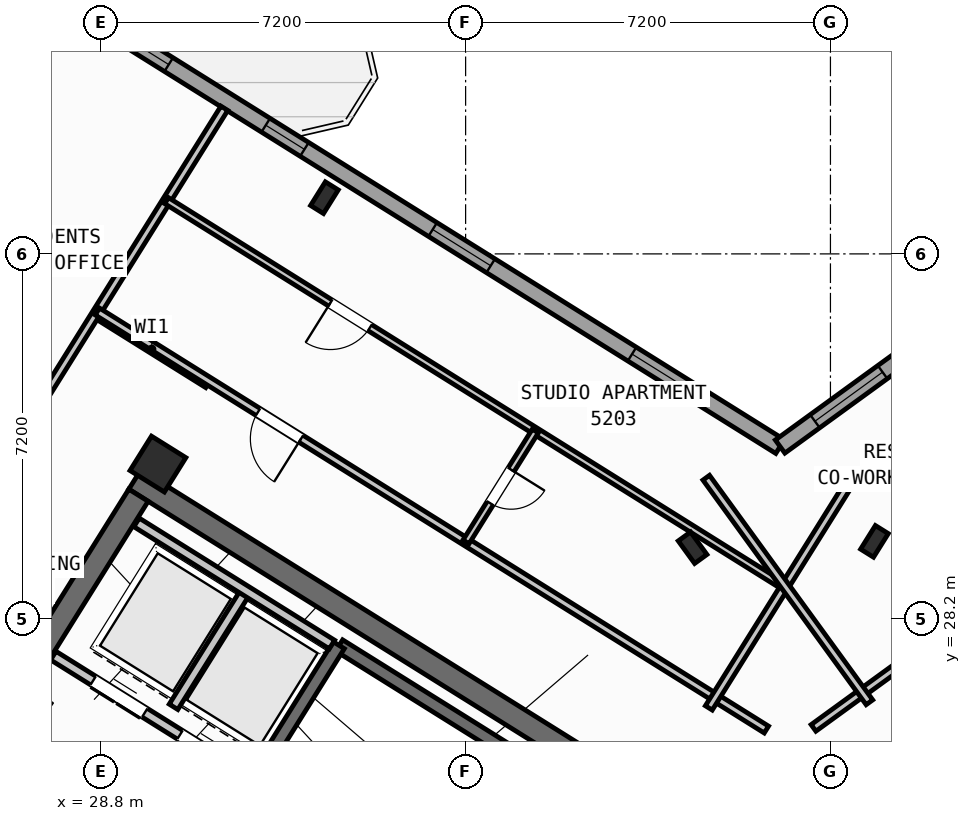
"""IFC4 building model, lengths in metres.
Left out: names, types, materials, properties, quantities, classifications, styles, units other than length and angle.
Written with IfcOpenShell. Run it as: python <this file> out.ifc"""

import sys

from ifc_helpers import new_model, si_unit, direction, frame, frame_2d, origin, origin_2d, place, context, subcontext, project, spatial, rectangle, hollow_rectangle, i_section, extrude, source, transform, mapped, element, fill, save


model = new_model("IFC4")
c1 = context("Model", 3, precision=1e-05, world=origin(), true_north=direction((0.0, 1.0)))
c2 = subcontext(c1, "Body", "Model", "MODEL_VIEW")
j1 = project(units=[si_unit("LENGTHUNIT", "METRE"), si_unit("PLANEANGLEUNIT", "RADIAN")], contexts=[c1])
p1 = place(None, origin())
s1 = spatial("IfcSite", under=j1, at=p1, CompositionType="ELEMENT")
p2 = place(p1, origin())
s2 = spatial("IfcBuilding", under=s1, at=p2, CompositionType="ELEMENT")
p3 = place(p2, frame((0.0, 0.0, 207.6)))
s3 = spatial("IfcBuildingStorey", under=s2, at=p3, CompositionType="ELEMENT", Elevation=207.6)
p4 = place(p3, frame((40.531, 24.036, 0.0), z_axis=(0.0, 0.0, 1.0), x_axis=(-0.848048787466, 0.529918157905, 0.0)))
e1 = element("IfcWall", 1, at=p4, inside=s3, PredefinedType="SHEAR", context=c2, shape_type="SweptSolid", body=[
    extrude(rectangle(XDim=13.04, YDim=0.45, at=frame_2d((6.52, 0.0))), origin(), (0.0, 0.0, 1.0), 3.35),
])
p5 = place(p3, frame((29.544, 30.636, 0.0), z_axis=(0.0, 0.0, 1.0), x_axis=(-0.529902075036, -0.848058836916, 0.0)))
e2 = element("IfcWall", 2, at=p5, inside=s3, PredefinedType="SHEAR", context=c2, shape_type="SweptSolid", body=[
    extrude(rectangle(XDim=3.625, YDim=0.45, at=frame_2d((1.812, 0.0))), origin(), (0.0, 0.0, 1.0), 3.35),
])
p6 = place(p3, frame((44.406, 24.172, 0.0), z_axis=(0.0, 0.0, 1.0), x_axis=(0.809012867805, 0.587790931986, 0.0)))
e3 = element("IfcWall", 3, at=p6, inside=s3, PredefinedType="SHEAR", context=c2, shape_type="SweptSolid", body=[
    extrude(rectangle(XDim=12.24, YDim=0.45, at=frame_2d((6.12, 0.0))), origin(), (0.0, 0.0, 1.0), 3.35),
])
m1 = source(origin(), c2, "Body", "SweptSolid", [
    extrude(i_section(OverallWidth=0.3, OverallDepth=0.55, WebThickness=0.015, FlangeThickness=0.029, at=origin_2d()), origin(), (0.0, 0.0, 1.0), 3.6),
])
for number, where, z_axis, x_axis in (
    (4, (44.068, 29.726, 0.0), (0.0, 0.0, 1.0), (-0.848, 0.53, 0.0)),
    (5, (33.213, 36.509, 0.0), (0.0, 0.0, 1.0), (-0.848, 0.53, 0.0)),
):
    element("IfcColumn", number, at=place(p3, frame(where, z_axis=z_axis, x_axis=x_axis)), inside=s3, PredefinedType="COLUMN", context=c2, shape_type="MappedRepresentation", body=[
        mapped(m1, transform((0.0, 0.0, 0.0), scale=1.0)),
    ])
m2 = source(origin(), c2, "Body", "SweptSolid", [
    extrude(hollow_rectangle(XDim=0.8, YDim=0.8, WallThickness=0.032, at=origin_2d()), origin(), (0.0, 0.0, 1.0), 3.6),
])
p7 = place(p3, frame((29.928, 31.251, 0.0), z_axis=(0.0, 0.0, 1.0), x_axis=(-0.848048096156, 0.529919264233, 0.0)))
e6 = element("IfcColumn", 6, at=p7, inside=s3, PredefinedType="COLUMN", context=c2, shape_type="MappedRepresentation", body=[
    mapped(m2, transform((0.0, 0.0, 0.0), scale=1.0)),
])
p8 = place(p3, frame((40.479, 29.601, 0.0), z_axis=(0.0, 0.0, 1.0), x_axis=(0.809016994375, 0.587785252292, 0.0)))
e7 = element("IfcColumn", 7, at=p8, inside=s3, PredefinedType="COLUMN", context=c2, shape_type="MappedRepresentation", body=[
    mapped(m1, transform((0.0, 0.0, 0.0), scale=1.0)),
])
p9 = place(p3, frame((31.76, 12.183, 0.0), z_axis=(0.0, 0.0, 1.0), x_axis=(-0.848047074256, 0.529920899612, 0.0)))
e8 = element("IfcWall", 8, at=p9, inside=s3, PredefinedType="STANDARD", context=c2, shape_type="SweptSolid", body=[
    extrude(rectangle(XDim=30.652, YDim=0.32, at=frame_2d((15.326, 0.0))), origin(), (0.0, 0.0, 1.0), 3.35),
])
p10 = place(p9, frame((15.166, 0.0, 0.0)))
e9 = element("IfcOpeningElement", 9, at=p10, cuts=e8, PredefinedType="OPENING", context=c2, shape_type="SweptSolid", body=[
    extrude(rectangle(XDim=1.2, YDim=2.15, at=frame_2d((0.6, 1.075))), frame((0.0, 0.17, 0.0), z_axis=(0.0, -1.0, 0.0), x_axis=(1.0, 0.0, 0.0)), (0.0, 0.0, 1.0), 0.34),
])
p11 = place(p9, frame((2.24, 0.0, 0.9)))
e10 = element("IfcOpeningElement", 10, at=p11, cuts=e8, PredefinedType="OPENING", context=c2, shape_type="SweptSolid", body=[
    extrude(rectangle(XDim=1.65, YDim=1.45, at=frame_2d((0.825, 0.725))), frame((0.0, 0.17, 0.0), z_axis=(0.0, -1.0, 0.0), x_axis=(1.0, 0.0, 0.0)), (0.0, 0.0, 1.0), 0.34),
])
p12 = place(p9, frame((7.469, 0.0, 0.9)))
e11 = element("IfcOpeningElement", 11, at=p12, cuts=e8, PredefinedType="OPENING", context=c2, shape_type="SweptSolid", body=[
    extrude(rectangle(XDim=1.65, YDim=1.45, at=frame_2d((0.825, 0.725))), frame((0.0, 0.17, 0.0), z_axis=(0.0, -1.0, 0.0), x_axis=(1.0, 0.0, 0.0)), (0.0, 0.0, 1.0), 0.34),
])
p13 = place(p9, frame((12.623, 0.0, 1.0)))
e12 = element("IfcOpeningElement", 12, at=p13, cuts=e8, PredefinedType="OPENING", context=c2, shape_type="SweptSolid", body=[
    extrude(rectangle(XDim=0.9, YDim=1.25, at=frame_2d((0.45, 0.625))), frame((0.0, 0.17, 0.0), z_axis=(0.0, -1.0, 0.0), x_axis=(1.0, 0.0, 0.0)), (0.0, 0.0, 1.0), 0.34),
])
p14 = place(p9, frame((19.715, 0.0, 1.0)))
e13 = element("IfcOpeningElement", 13, at=p14, cuts=e8, PredefinedType="OPENING", context=c2, shape_type="SweptSolid", body=[
    extrude(rectangle(XDim=0.9, YDim=1.25, at=frame_2d((0.45, 0.625))), frame((0.0, 0.17, 0.0), z_axis=(0.0, -1.0, 0.0), x_axis=(1.0, 0.0, 0.0)), (0.0, 0.0, 1.0), 0.34),
])
p15 = place(p9, frame((25.566, 0.0, 0.9)))
e14 = element("IfcOpeningElement", 14, at=p15, cuts=e8, PredefinedType="OPENING", context=c2, shape_type="SweptSolid", body=[
    extrude(rectangle(XDim=1.65, YDim=1.45, at=frame_2d((0.825, 0.725))), frame((0.0, 0.17, 0.0), z_axis=(0.0, -1.0, 0.0), x_axis=(1.0, 0.0, 0.0)), (0.0, 0.0, 1.0), 0.34),
])
p16 = place(p9, frame((28.896, 0.0, 1.0)))
e15 = element("IfcOpeningElement", 15, at=p16, cuts=e8, PredefinedType="OPENING", context=c2, shape_type="SweptSolid", body=[
    extrude(rectangle(XDim=0.9, YDim=1.25, at=frame_2d((0.45, 0.625))), frame((0.0, 0.17, 0.0), z_axis=(0.0, -1.0, 0.0), x_axis=(1.0, 0.0, 0.0)), (0.0, 0.0, 1.0), 0.34),
])
p17 = place(p3, frame((17.424, 47.083, 0.0), z_axis=(0.0, 0.0, 1.0), x_axis=(0.848049927979, -0.529916332693, 0.0)))
e16 = element("IfcWall", 16, at=p17, inside=s3, PredefinedType="STANDARD", context=c2, shape_type="SweptSolid", body=[
    extrude(rectangle(XDim=29.223, YDim=0.32, at=frame_2d((14.612, 0.0))), origin(), (0.0, 0.0, 1.0), 3.35),
])
p18 = place(p17, frame((2.526, 0.0, 0.0)))
e17 = element("IfcOpeningElement", 17, at=p18, cuts=e16, PredefinedType="OPENING", context=c2, shape_type="SweptSolid", body=[
    extrude(rectangle(XDim=1.05, YDim=2.15, at=frame_2d((0.525, 1.075))), frame((0.0, 0.17, 0.0), z_axis=(0.0, -1.0, 0.0), x_axis=(1.0, 0.0, 0.0)), (0.0, 0.0, 1.0), 0.34),
])
p19 = place(p17, frame((0.653, 0.0, 0.9)))
e18 = element("IfcOpeningElement", 18, at=p19, cuts=e16, PredefinedType="OPENING", context=c2, shape_type="SweptSolid", body=[
    extrude(rectangle(XDim=1.35, YDim=1.45, at=frame_2d((0.675, 0.725))), frame((0.0, 0.17, 0.0), z_axis=(0.0, -1.0, 0.0), x_axis=(1.0, 0.0, 0.0)), (0.0, 0.0, 1.0), 0.34),
])
p20 = place(p17, frame((6.897, 0.0, 1.0)))
e19 = element("IfcOpeningElement", 19, at=p20, cuts=e16, PredefinedType="OPENING", context=c2, shape_type="SweptSolid", body=[
    extrude(rectangle(XDim=0.9, YDim=1.25, at=frame_2d((0.45, 0.625))), frame((0.0, 0.17, 0.0), z_axis=(0.0, -1.0, 0.0), x_axis=(1.0, 0.0, 0.0)), (0.0, 0.0, 1.0), 0.34),
])
p21 = place(p17, frame((9.602, 0.0, 0.95)))
e20 = element("IfcOpeningElement", 20, at=p21, cuts=e16, PredefinedType="OPENING", context=c2, shape_type="SweptSolid", body=[
    extrude(rectangle(XDim=1.95, YDim=1.35, at=frame_2d((0.975, 0.675))), frame((0.0, 0.17, 0.0), z_axis=(0.0, -1.0, 0.0), x_axis=(1.0, 0.0, 0.0)), (0.0, 0.0, 1.0), 0.34),
])
p22 = place(p17, frame((14.096, 0.0, 1.0)))
e21 = element("IfcOpeningElement", 21, at=p22, cuts=e16, PredefinedType="OPENING", context=c2, shape_type="SweptSolid", body=[
    extrude(rectangle(XDim=0.9, YDim=1.25, at=frame_2d((0.45, 0.625))), frame((0.0, 0.17, 0.0), z_axis=(0.0, -1.0, 0.0), x_axis=(1.0, 0.0, 0.0)), (0.0, 0.0, 1.0), 0.34),
])
p23 = place(p17, frame((17.254, 0.0, 1.0)))
e22 = element("IfcOpeningElement", 22, at=p23, cuts=e16, PredefinedType="OPENING", context=c2, shape_type="SweptSolid", body=[
    extrude(rectangle(XDim=0.9, YDim=1.25, at=frame_2d((0.45, 0.625))), frame((0.0, 0.17, 0.0), z_axis=(0.0, -1.0, 0.0), x_axis=(1.0, 0.0, 0.0)), (0.0, 0.0, 1.0), 0.34),
])
p24 = place(p17, frame((21.139, 0.0, 0.9)))
e23 = element("IfcOpeningElement", 23, at=p24, cuts=e16, PredefinedType="OPENING", context=c2, shape_type="SweptSolid", body=[
    extrude(rectangle(XDim=1.35, YDim=1.45, at=frame_2d((0.675, 0.725))), frame((0.0, 0.17, 0.0), z_axis=(0.0, -1.0, 0.0), x_axis=(1.0, 0.0, 0.0)), (0.0, 0.0, 1.0), 0.34),
])
p25 = place(p17, frame((25.778, 0.0, 0.9)))
e24 = element("IfcOpeningElement", 24, at=p25, cuts=e16, PredefinedType="OPENING", context=c2, shape_type="SweptSolid", body=[
    extrude(rectangle(XDim=1.35, YDim=1.45, at=frame_2d((0.675, 0.725))), frame((0.0, 0.17, 0.0), z_axis=(0.0, -1.0, 0.0), x_axis=(1.0, 0.0, 0.0)), (0.0, 0.0, 1.0), 0.34),
])
p26 = place(p3, frame((42.207, 31.597, 0.0), z_axis=(0.0, 0.0, 1.0), x_axis=(0.809020333377, 0.587780656523, 0.0)))
e25 = element("IfcWall", 25, at=p26, inside=s3, PredefinedType="STANDARD", context=c2, shape_type="SweptSolid", body=[
    extrude(rectangle(XDim=15.223, YDim=0.32, at=frame_2d((7.611, 0.0))), origin(), (0.0, 0.0, 1.0), 3.35),
])
p27 = place(p26, frame((12.82, 0.0, 0.0)))
e26 = element("IfcOpeningElement", 26, at=p27, cuts=e25, PredefinedType="OPENING", context=c2, shape_type="SweptSolid", body=[
    extrude(rectangle(XDim=1.05, YDim=2.15, at=frame_2d((0.525, 1.075))), frame((0.0, 0.17, 0.0), z_axis=(0.0, -1.0, 0.0), x_axis=(1.0, 0.0, 0.0)), (0.0, 0.0, 1.0), 0.34),
])
p28 = place(p26, frame((0.85, 0.0, 0.9)))
e27 = element("IfcOpeningElement", 27, at=p28, cuts=e25, PredefinedType="OPENING", context=c2, shape_type="SweptSolid", body=[
    extrude(rectangle(XDim=1.65, YDim=1.45, at=frame_2d((0.825, 0.725))), frame((0.0, 0.17, 0.0), z_axis=(0.0, -1.0, 0.0), x_axis=(1.0, 0.0, 0.0)), (0.0, 0.0, 1.0), 0.34),
])
p29 = place(p26, frame((5.769, 0.0, 0.9)))
e28 = element("IfcOpeningElement", 28, at=p29, cuts=e25, PredefinedType="OPENING", context=c2, shape_type="SweptSolid", body=[
    extrude(rectangle(XDim=1.35, YDim=1.45, at=frame_2d((0.675, 0.725))), frame((0.0, 0.17, 0.0), z_axis=(0.0, -1.0, 0.0), x_axis=(1.0, 0.0, 0.0)), (0.0, 0.0, 1.0), 0.34),
])
p30 = place(p26, frame((10.219, 0.0, 1.0)))
e29 = element("IfcOpeningElement", 29, at=p30, cuts=e25, PredefinedType="OPENING", context=c2, shape_type="SweptSolid", body=[
    extrude(rectangle(XDim=0.9, YDim=1.25, at=frame_2d((0.45, 0.625))), frame((0.0, 0.17, 0.0), z_axis=(0.0, -1.0, 0.0), x_axis=(1.0, 0.0, 0.0)), (0.0, 0.0, 1.0), 0.34),
])
p31 = place(p3, frame((39.721, 23.788, 0.0), z_axis=(0.0, 0.0, 1.0), x_axis=(-0.848054434086, 0.529909121291, 0.0)))
e30 = element("IfcWall", 30, at=p31, inside=s3, PredefinedType="SHEAR", context=c2, shape_type="SweptSolid", body=[
    extrude(rectangle(XDim=7.33, YDim=0.26, at=frame_2d((3.665, 0.0))), origin(), (0.0, 0.0, 1.0), 3.35),
])
p32 = place(p3, frame((33.496, 27.677, 0.0), z_axis=(0.0, 0.0, 1.0), x_axis=(-0.529908658664, -0.84805472316, 0.0)))
e31 = element("IfcWall", 31, at=p32, inside=s3, PredefinedType="SHEAR", context=c2, shape_type="SweptSolid", body=[
    extrude(rectangle(XDim=3.16, YDim=0.26, at=frame_2d((1.58, 0.0))), origin(), (0.0, 0.0, 1.0), 3.35),
])
p33 = place(p3, frame((31.822, 24.998, 0.0), z_axis=(0.0, 0.0, 1.0), x_axis=(-0.848054125777, 0.529909614701, 0.0)))
e32 = element("IfcWall", 32, at=p33, inside=s3, PredefinedType="STANDARD", context=c2, shape_type="SweptSolid", body=[
    extrude(rectangle(XDim=4.668, YDim=0.2, at=frame_2d((2.334, 0.0))), origin(), (0.0, 0.0, 1.0), 3.34),
])
p34 = place(p33, frame((0.52, 0.0, 0.0)))
e33 = element("IfcOpeningElement", 33, at=p34, cuts=e32, PredefinedType="OPENING", context=c2, shape_type="SweptSolid", body=[
    extrude(rectangle(XDim=1.2, YDim=2.15, at=frame_2d((0.6, 1.075))), frame((0.0, 0.11, 0.0), z_axis=(0.0, -1.0, 0.0), x_axis=(1.0, 0.0, 0.0)), (0.0, 0.0, 1.0), 0.22),
])
p35 = place(p33, frame((2.54, 0.0, 0.0)))
e34 = element("IfcOpeningElement", 34, at=p35, cuts=e32, PredefinedType="OPENING", context=c2, shape_type="SweptSolid", body=[
    extrude(rectangle(XDim=1.2, YDim=2.15, at=frame_2d((0.6, 1.075))), frame((0.0, 0.11, 0.0), z_axis=(0.0, -1.0, 0.0), x_axis=(1.0, 0.0, 0.0)), (0.0, 0.0, 1.0), 0.22),
])
p36 = place(p3, frame((31.645, 28.716, 0.0), z_axis=(0.0, 0.0, 1.0), x_axis=(-0.52986693015, -0.848080795876, 0.0)))
e35 = element("IfcWall", 35, at=p36, inside=s3, PredefinedType="STANDARD", context=c2, shape_type="SweptSolid", body=[
    extrude(rectangle(XDim=2.66, YDim=0.2, at=frame_2d((1.33, 0.0))), origin(), (0.0, 0.0, 1.0), 3.34),
])
p37 = place(p3, frame((33.363, 27.69, 0.0), z_axis=(0.0, 0.0, 1.0), x_axis=(-0.84804957148, 0.529916903215, 0.0)))
e36 = element("IfcWall", 36, at=p37, inside=s3, PredefinedType="STANDARD", context=c2, shape_type="SweptSolid", body=[
    extrude(rectangle(XDim=4.548, YDim=0.2, at=frame_2d((2.274, 0.0))), origin(), (0.0, 0.0, 1.0), 3.34),
])
p38 = place(p3, frame((30.914, 32.829, 0.0), z_axis=(0.0, 0.0, 1.0), x_axis=(-0.848008813643, 0.529982124211, 0.0)))
e37 = element("IfcWall", 37, at=p38, inside=s3, PredefinedType="PARTITIONING", context=c2, shape_type="SweptSolid", body=[
    extrude(rectangle(XDim=2.61, YDim=0.16, at=frame_2d((1.305, 0.0))), origin(), (0.0, 0.0, 1.0), 3.34),
])
p39 = place(p3, frame((31.239, 38.274, 0.0), z_axis=(0.0, 0.0, 1.0), x_axis=(-0.529925472745, -0.848044216616, 0.0)))
e38 = element("IfcWall", 38, at=p39, inside=s3, PredefinedType="PARTITIONING", context=c2, shape_type="SweptSolid", body=[
    extrude(rectangle(XDim=11.65, YDim=0.16, at=frame_2d((5.825, 0.0))), origin(), (0.0, 0.0, 1.0), 3.34),
])
p40 = place(p3, frame((41.936, 26.012, 0.0), z_axis=(0.0, 0.0, 1.0), x_axis=(-0.848051154596, 0.529914369676, 0.0)))
e39 = element("IfcWall", 39, at=p40, inside=s3, PredefinedType="PARTITIONING", context=c2, shape_type="SweptSolid", body=[
    extrude(rectangle(XDim=15.57, YDim=0.16, at=frame_2d((7.785, 0.0))), origin(), (0.0, 0.0, 1.0), 3.34),
])
p41 = place(p40, frame((10.83, 0.0, 0.0)))
e40 = element("IfcOpeningElement", 40, at=p41, cuts=e39, PredefinedType="OPENING", context=c2, shape_type="SweptSolid", body=[
    extrude(rectangle(XDim=1.0, YDim=2.1, at=frame_2d((0.5, 1.05))), frame((0.0, 0.09, 0.0), z_axis=(0.0, -1.0, 0.0), x_axis=(1.0, 0.0, 0.0)), (0.0, 0.0, 1.0), 0.18),
])
p42 = place(p3, frame((43.704, 31.086, 0.0), z_axis=(0.0, 0.0, 1.0), x_axis=(-0.529906828443, -0.848055866774, 0.0)))
e41 = element("IfcWall", 41, at=p42, inside=s3, PredefinedType="PARTITIONING", context=c2, shape_type="SweptSolid", body=[
    extrude(rectangle(XDim=5.48, YDim=0.16, at=frame_2d((2.74, 0.0))), origin(), (0.0, 0.0, 1.0), 3.34),
])
p43 = place(p3, frame((42.226, 28.873, 0.0), z_axis=(0.0, 0.0, 1.0), x_axis=(-0.848049134363, 0.529917602752, 0.0)))
e42 = element("IfcWall", 42, at=p43, inside=s3, PredefinedType="PLUMBINGWALL", context=c2, shape_type="SweptSolid", body=[
    extrude(rectangle(XDim=14.3, YDim=0.14, at=frame_2d((7.15, 0.0))), origin(), (0.0, 0.0, 1.0), 3.34),
])
p44 = place(p43, frame((9.57, 0.0, 0.0)))
e43 = element("IfcOpeningElement", 43, at=p44, cuts=e42, PredefinedType="OPENING", context=c2, shape_type="SweptSolid", body=[
    extrude(rectangle(XDim=0.92, YDim=2.08, at=frame_2d((0.46, 1.04))), frame((0.0, 0.08, 0.0), z_axis=(0.0, -1.0, 0.0), x_axis=(1.0, 0.0, 0.0)), (0.0, 0.0, 1.0), 0.16),
])
p45 = place(p3, frame((37.375, 31.904, 0.0), z_axis=(0.0, 0.0, 1.0), x_axis=(-0.529913878929, -0.848051461244, 0.0)))
e44 = element("IfcWall", 44, at=p45, inside=s3, PredefinedType="PLUMBINGWALL", context=c2, shape_type="SweptSolid", body=[
    extrude(rectangle(XDim=2.58, YDim=0.14, at=frame_2d((1.29, 0.0))), origin(), (0.0, 0.0, 1.0), 3.34),
])
p46 = place(p45, frame((0.9, 0.0, 0.0)))
e45 = element("IfcOpeningElement", 45, at=p46, cuts=e44, PredefinedType="OPENING", context=c2, shape_type="SweptSolid", body=[
    extrude(rectangle(XDim=0.78, YDim=2.05, at=frame_2d((0.39, 1.025))), frame((0.0, 0.08, 0.0), z_axis=(0.0, -1.0, 0.0), x_axis=(1.0, 0.0, 0.0)), (0.0, 0.0, 1.0), 0.16),
])
p47 = place(p3, frame((42.866, 26.044, 0.0), z_axis=(0.0, 0.0, 1.0), x_axis=(0.809020254154, 0.587780765566, 0.0)))
e46 = element("IfcWall", 46, at=p47, inside=s3, PredefinedType="PARTITIONING", context=c2, shape_type="SweptSolid", body=[
    extrude(rectangle(XDim=14.67, YDim=0.16, at=frame_2d((7.335, 0.0))), origin(), (0.0, 0.0, 1.0), 3.34),
])
p48 = place(p47, frame((3.215, 0.0, 0.0)))
e47 = element("IfcOpeningElement", 47, at=p48, cuts=e46, PredefinedType="OPENING", context=c2, shape_type="SweptSolid", body=[
    extrude(rectangle(XDim=1.0, YDim=2.1, at=frame_2d((0.5, 1.05))), frame((0.0, 0.09, 0.0), z_axis=(0.0, -1.0, 0.0), x_axis=(1.0, 0.0, 0.0)), (0.0, 0.0, 1.0), 0.18),
])
p49 = place(p47, frame((9.915, 0.0, 0.0)))
e48 = element("IfcOpeningElement", 48, at=p49, cuts=e46, PredefinedType="OPENING", context=c2, shape_type="SweptSolid", body=[
    extrude(rectangle(XDim=1.0, YDim=2.1, at=frame_2d((0.5, 1.05))), frame((0.0, 0.09, 0.0), z_axis=(0.0, -1.0, 0.0), x_axis=(1.0, 0.0, 0.0)), (0.0, 0.0, 1.0), 0.18),
])
p50 = place(p3, frame((43.969, 26.55, 0.0), z_axis=(0.0, 0.0, 1.0), x_axis=(-0.587776919386, 0.80902304852, 0.0)))
e49 = element("IfcWall", 49, at=p50, inside=s3, PredefinedType="PARTITIONING", context=c2, shape_type="SweptSolid", body=[
    extrude(rectangle(XDim=5.48, YDim=0.16, at=frame_2d((2.74, 0.0))), origin(), (0.0, 0.0, 1.0), 3.34),
])
m3 = source(origin(), c2, "Body", "SweptSolid", [
    extrude(rectangle(XDim=0.9, YDim=1.25, at=frame_2d((0.45, 0.625))), frame((0.0, 0.03, 0.0), z_axis=(0.0, -1.0, 0.0), x_axis=(1.0, 0.0, 0.0)), (0.0, 0.0, 1.0), 0.06),
])
p51 = place(p22, origin())
e50 = element("IfcWindow", 50, at=p51, inside=s3, PartitioningType="SINGLE_PANEL", PredefinedType="WINDOW", context=c2, shape_type="MappedRepresentation", body=[
    mapped(m3, transform((0.0, 0.0, 0.0), scale=1.0)),
])
fill(e21, e50)
p52 = place(p23, origin())
e51 = element("IfcWindow", 51, at=p52, inside=s3, PartitioningType="SINGLE_PANEL", PredefinedType="WINDOW", context=c2, shape_type="MappedRepresentation", body=[
    mapped(m3, transform((0.0, 0.0, 0.0), scale=1.0)),
])
fill(e22, e51)
m4 = source(origin(), c2, "Body", "SweptSolid", [
    extrude(rectangle(XDim=1.35, YDim=1.45, at=frame_2d((0.675, 0.725))), frame((0.0, 0.03, 0.0), z_axis=(0.0, -1.0, 0.0), x_axis=(1.0, 0.0, 0.0)), (0.0, 0.0, 1.0), 0.06),
])
p53 = place(p24, origin())
e52 = element("IfcWindow", 52, at=p53, inside=s3, PartitioningType="SINGLE_PANEL", PredefinedType="WINDOW", context=c2, shape_type="MappedRepresentation", body=[
    mapped(m4, transform((0.0, 0.0, 0.0), scale=1.0)),
])
fill(e23, e52)
p54 = place(p25, origin())
e53 = element("IfcWindow", 53, at=p54, inside=s3, PartitioningType="SINGLE_PANEL", PredefinedType="WINDOW", context=c2, shape_type="MappedRepresentation", body=[
    mapped(m4, transform((0.0, 0.0, 0.0), scale=1.0)),
])
fill(e24, e53)
m5 = source(origin(), c2, "Body", "SweptSolid", [
    extrude(rectangle(XDim=1.65, YDim=1.45, at=frame_2d((0.825, 0.725))), frame((0.0, 0.03, 0.0), z_axis=(0.0, -1.0, 0.0), x_axis=(1.0, 0.0, 0.0)), (0.0, 0.0, 1.0), 0.06),
])
p55 = place(p28, origin())
e54 = element("IfcWindow", 54, at=p55, inside=s3, PartitioningType="SINGLE_PANEL", PredefinedType="WINDOW", context=c2, shape_type="MappedRepresentation", body=[
    mapped(m5, transform((0.0, 0.0, 0.0), scale=1.0)),
])
fill(e27, e54)
m6 = source(origin(), c2, "Body", "SweptSolid", [
    extrude(rectangle(XDim=1.2, YDim=2.15, at=frame_2d((0.6, 1.075))), frame((0.0, 0.025, 0.0), z_axis=(0.0, -1.0, 0.0), x_axis=(1.0, 0.0, 0.0)), (0.0, 0.0, 1.0), 0.05),
])
p56 = place(p34, origin())
e55 = element("IfcDoor", 55, at=p56, inside=s3, OperationType="DOUBLE_DOOR_SLIDING", PredefinedType="DOOR", context=c2, shape_type="MappedRepresentation", body=[
    mapped(m6, transform((0.0, 0.0, 0.0), scale=1.0)),
])
fill(e33, e55)
p57 = place(p35, origin())
e56 = element("IfcDoor", 56, at=p57, inside=s3, OperationType="DOUBLE_DOOR_SLIDING", PredefinedType="DOOR", context=c2, shape_type="MappedRepresentation", body=[
    mapped(m6, transform((0.0, 0.0, 0.0), scale=1.0)),
])
fill(e34, e56)
m7 = source(origin(), c2, "Body", "SweptSolid", [
    extrude(rectangle(XDim=1.0, YDim=2.1, at=frame_2d((0.5, 1.05))), frame((0.0, 0.025, 0.0), z_axis=(0.0, -1.0, 0.0), x_axis=(1.0, 0.0, 0.0)), (0.0, 0.0, 1.0), 0.05),
])
p58 = place(p41, origin())
e57 = element("IfcDoor", 57, at=p58, inside=s3, OperationType="SINGLE_SWING_LEFT", PredefinedType="DOOR", context=c2, shape_type="MappedRepresentation", body=[
    mapped(m7, transform((0.0, 0.0, 0.0), scale=1.0)),
])
fill(e40, e57)
m8 = source(origin(), c2, "Body", "SweptSolid", [
    extrude(rectangle(XDim=0.92, YDim=2.08, at=frame_2d((0.46, 1.04))), frame((0.0, 0.025, 0.0), z_axis=(0.0, -1.0, 0.0), x_axis=(1.0, 0.0, 0.0)), (0.0, 0.0, 1.0), 0.05),
])
p59 = place(p44, origin())
e58 = element("IfcDoor", 58, at=p59, inside=s3, OperationType="SINGLE_SWING_RIGHT", PredefinedType="DOOR", context=c2, shape_type="MappedRepresentation", body=[
    mapped(m8, transform((0.0, 0.0, 0.0), scale=1.0)),
])
fill(e43, e58)
m9 = source(origin(), c2, "Body", "SweptSolid", [
    extrude(rectangle(XDim=0.78, YDim=2.05, at=frame_2d((0.39, 1.025))), frame((0.0, 0.025, 0.0), z_axis=(0.0, -1.0, 0.0), x_axis=(1.0, 0.0, 0.0)), (0.0, 0.0, 1.0), 0.05),
])
p60 = place(p46, origin())
e59 = element("IfcDoor", 59, at=p60, inside=s3, OperationType="SINGLE_SWING_LEFT", PredefinedType="DOOR", context=c2, shape_type="MappedRepresentation", body=[
    mapped(m9, transform((0.0, 0.0, 0.0), scale=1.0)),
])
fill(e45, e59)
save(model, sys.argv[1])
